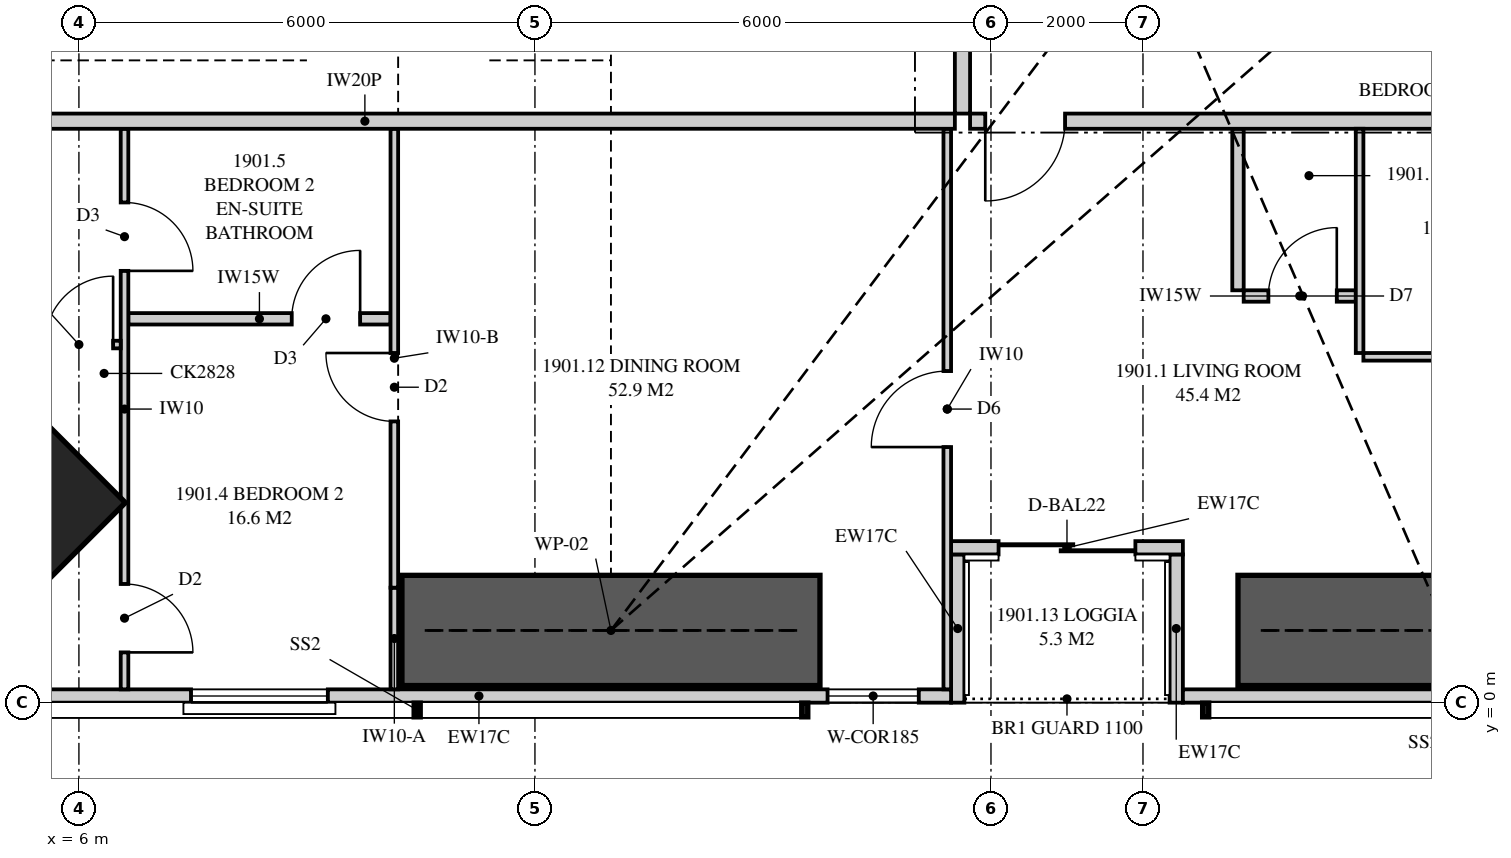
"""IFC4 building model, lengths in metres.
Left out: names, types, materials, properties, quantities, classifications, styles, units other than length and angle.
Written with IfcOpenShell. Run it as: python <this file> out.ifc"""

import sys

from ifc_helpers import new_model, si_unit, direction, frame, frame_2d, origin, origin_2d, place, context, subcontext, project, spatial, polyline, rectangle, hollow_rectangle, outline, extrude, element, fill, save


model = new_model("IFC4")
c1 = context("Model", 3, precision=1e-05, world=origin(), true_north=direction((0.0, 1.0)))
c2 = subcontext(c1, "Body", "Model", "MODEL_VIEW")
j1 = project(units=[si_unit("LENGTHUNIT", "METRE"), si_unit("PLANEANGLEUNIT", "RADIAN")], contexts=[c1])
p1 = place(None, origin())
s1 = spatial("IfcSite", under=j1, at=p1, CompositionType="ELEMENT")
p2 = place(p1, origin())
s2 = spatial("IfcBuilding", under=s1, at=p2, CompositionType="ELEMENT")
p3 = place(p2, frame((0.0, 0.0, 71.25)))
s3 = spatial("IfcBuildingStorey", under=s2, at=p3, CompositionType="ELEMENT", Elevation=71.25)
p4 = place(p3, frame((4.631, 2.631, 0.0), z_axis=(0.0, 0.0, 1.0), x_axis=(0.707106781187, 0.707106781187, 0.0)))
e1 = element("IfcColumn", 1, at=p4, inside=s3, PredefinedType="COLUMN", context=c2, shape_type="SweptSolid", body=[
    extrude(hollow_rectangle(XDim=2.8, YDim=2.8, WallThickness=0.175, at=origin_2d()), origin(), (0.0, 0.0, 1.0), 3.5),
])
p5 = place(p3, frame((5.051, 0.087, 0.0), z_axis=(0.0, 0.0, 1.0), x_axis=(1.0, 0.0, 0.0)))
e2 = element("IfcWall", 2, at=p5, inside=s3, PredefinedType="SOLIDWALL", context=c2, shape_type="SweptSolid", body=[
    extrude(rectangle(XDim=12.424, YDim=0.175, at=frame_2d((6.212, 0.0))), origin(), (0.0, 0.0, 1.0), 3.22),
])
p6 = place(p5, frame((2.424, 0.0, 0.4)))
e3 = element("IfcOpeningElement", 3, at=p6, cuts=e2, PredefinedType="OPENING", context=c2, shape_type="SweptSolid", body=[
    extrude(rectangle(XDim=1.8, YDim=1.85, at=frame_2d((0.9, 0.925))), frame((0.0, 0.097, 0.0), z_axis=(0.0, -1.0, 0.0), x_axis=(1.0, 0.0, 0.0)), (0.0, 0.0, 1.0), 0.195),
])
p7 = place(p5, frame((10.799, 0.0, 0.4)))
e4 = element("IfcOpeningElement", 4, at=p7, cuts=e2, PredefinedType="OPENING", context=c2, shape_type="SweptSolid", body=[
    extrude(rectangle(XDim=1.2, YDim=1.85, at=frame_2d((0.6, 0.925))), frame((0.0, 0.097, 0.0), z_axis=(0.0, -1.0, 0.0), x_axis=(1.0, 0.0, 0.0)), (0.0, 0.0, 1.0), 0.195),
])
p8 = place(p3, frame((20.525, 0.087, 0.0), z_axis=(0.0, 0.0, 1.0), x_axis=(1.0, 0.0, 0.0)))
e5 = element("IfcWall", 5, at=p8, inside=s3, PredefinedType="SOLIDWALL", context=c2, shape_type="SweptSolid", body=[
    extrude(rectangle(XDim=17.275, YDim=0.175, at=frame_2d((8.638, 0.0))), origin(), (0.0, 0.0, 1.0), 3.22),
])
p9 = place(p8, frame((6.775, 0.0, 0.4)))
e6 = element("IfcOpeningElement", 6, at=p9, cuts=e5, PredefinedType="OPENING", context=c2, shape_type="SweptSolid", body=[
    extrude(rectangle(XDim=1.8, YDim=1.85, at=frame_2d((0.9, 0.925))), frame((0.0, 0.097, 0.0), z_axis=(0.0, -1.0, 0.0), x_axis=(1.0, 0.0, 0.0)), (0.0, 0.0, 1.0), 0.195),
])
p10 = place(p8, frame((9.81, 0.0, 0.4)))
e7 = element("IfcOpeningElement", 7, at=p10, cuts=e5, PredefinedType="OPENING", context=c2, shape_type="SweptSolid", body=[
    extrude(rectangle(XDim=1.8, YDim=1.85, at=frame_2d((0.9, 0.925))), frame((0.0, 0.097, 0.0), z_axis=(0.0, -1.0, 0.0), x_axis=(1.0, 0.0, 0.0)), (0.0, 0.0, 1.0), 0.195),
])
p11 = place(p3, frame((17.475, 2.038, 0.0), z_axis=(0.0, 0.0, 1.0), x_axis=(1.0, 0.0, 0.0)))
e8 = element("IfcWall", 8, at=p11, inside=s3, PredefinedType="SOLIDWALL", context=c2, shape_type="SweptSolid", body=[
    extrude(rectangle(XDim=3.05, YDim=0.175, at=frame_2d((1.525, 0.0))), origin(), (0.0, 0.0, 1.0), 3.22),
])
p12 = place(p11, frame((0.625, 0.0, 0.0)))
e9 = element("IfcOpeningElement", 9, at=p12, cuts=e8, PredefinedType="OPENING", context=c2, shape_type="SweptSolid", body=[
    extrude(rectangle(XDim=1.8, YDim=2.25, at=frame_2d((0.9, 1.125))), frame((0.0, 0.097, 0.0), z_axis=(0.0, -1.0, 0.0), x_axis=(1.0, 0.0, 0.0)), (0.0, 0.0, 1.0), 0.195),
])
for number, where, z_axis, x_axis in (
    (10, (17.562, 0.0, 0.0), (0.0, 0.0, 1.0), (0.0, 1.0, 0.0)),
    (11, (20.438, 0.0, 0.0), (0.0, 0.0, 1.0), (0.0, 1.0, 0.0)),
):
    element("IfcWall", number, at=place(p3, frame(where, z_axis=z_axis, x_axis=x_axis)), inside=s3, PredefinedType="SOLIDWALL", context=c2, shape_type="SweptSolid", body=[
        extrude(outline(polyline([(0.0, 0.0), (1.95, 0.0), (1.95, 3.22), (1.65, 3.22), (1.65, 2.1), (0.25, 2.1), (0.25, 3.22), (0.0, 3.22), (0.0, 0.0)])), frame((0.0, 0.087, 0.0), z_axis=(0.0, -1.0, 0.0), x_axis=(1.0, 0.0, 0.0)), (0.0, 0.0, 1.0), 0.175),
    ])
p13 = place(p3, frame((17.725, 7.65, 0.0), z_axis=(0.0, 0.0, 1.0), x_axis=(1.0, 0.0, 0.0)))
e12 = element("IfcWall", 12, at=p13, inside=s3, PredefinedType="PARTITIONING", context=c2, shape_type="SweptSolid", body=[
    extrude(outline(polyline([(0.0, 0.0), (16.075, 0.0), (16.075, 3.22), (12.137, 3.22), (12.137, 2.641), (11.364, 2.641), (11.364, 3.22), (11.217, 3.22), (11.217, 2.641), (10.366, 2.641), (10.366, 3.22), (6.564, 3.22), (6.564, 2.694), (5.986, 2.694), (5.986, 3.22), (3.693, 3.22), (3.693, 2.641), (2.439, 2.641), (2.439, 3.22), (0.689, 3.22), (0.689, 2.641), (0.0, 2.641), (0.0, 0.0)])), frame((0.0, 0.1, 0.0), z_axis=(0.0, -1.0, 0.0), x_axis=(1.0, 0.0, 0.0)), (0.0, 0.0, 1.0), 0.2),
])
p14 = place(p13, frame((0.2, 0.0, 0.0)))
e13 = element("IfcOpeningElement", 13, at=p14, cuts=e12, PredefinedType="OPENING", context=c2, shape_type="SweptSolid", body=[
    extrude(rectangle(XDim=1.05, YDim=2.2, at=frame_2d((0.525, 1.1))), frame((0.0, 0.11, 0.0), z_axis=(0.0, -1.0, 0.0), x_axis=(1.0, 0.0, 0.0)), (0.0, 0.0, 1.0), 0.22),
])
p15 = place(p3, frame((6.6, 0.175, 0.0), z_axis=(0.0, 0.0, 1.0), x_axis=(0.0, 1.0, 0.0)))
e14 = element("IfcWall", 14, at=p15, inside=s3, PredefinedType="PARTITIONING", context=c2, shape_type="SweptSolid", body=[
    extrude(outline(polyline([(0.0, 0.0), (7.375, 0.0), (7.375, 3.22), (2.863, 3.22), (2.863, 2.848), (2.785, 2.854), (2.785, 2.1), (1.337, 2.1), (1.337, 3.22), (0.0, 3.22), (0.0, 0.0)])), frame((0.0, 0.05, 0.0), z_axis=(0.0, -1.0, 0.0), x_axis=(1.0, 0.0, 0.0)), (0.0, 0.0, 1.0), 0.1),
])
p16 = place(p15, frame((0.486, 0.0, 0.0)))
e15 = element("IfcOpeningElement", 15, at=p16, cuts=e14, PredefinedType="OPENING", context=c2, shape_type="SweptSolid", body=[
    extrude(rectangle(XDim=0.9, YDim=2.1, at=frame_2d((0.45, 1.05))), frame((0.0, 0.06, 0.0), z_axis=(0.0, -1.0, 0.0), x_axis=(1.0, 0.0, 0.0)), (0.0, 0.0, 1.0), 0.12),
])
p17 = place(p15, frame((5.506, 0.0, 0.0)))
e16 = element("IfcOpeningElement", 16, at=p17, cuts=e14, PredefinedType="OPENING", context=c2, shape_type="SweptSolid", body=[
    extrude(rectangle(XDim=0.9, YDim=2.1, at=frame_2d((0.45, 1.05))), frame((0.0, 0.06, 0.0), z_axis=(0.0, -1.0, 0.0), x_axis=(1.0, 0.0, 0.0)), (0.0, 0.0, 1.0), 0.12),
])
p18 = place(p3, frame((10.15, 0.175, 0.0), z_axis=(0.0, 0.0, 1.0), x_axis=(0.0, 1.0, 0.0)))
e17 = element("IfcWall", 17, at=p18, inside=s3, PredefinedType="PARTITIONING", context=c2, shape_type="SweptSolid", body=[
    extrude(outline(polyline([(0.0, 0.0), (1.338, 0.0), (1.338, 2.1), (0.624, 2.1), (0.624, 3.22), (0.0, 3.22), (0.0, 0.0)])), frame((0.0, 0.05, 0.0), z_axis=(0.0, -1.0, 0.0), x_axis=(1.0, 0.0, 0.0)), (0.0, 0.0, 1.0), 0.1),
])
p19 = place(p3, frame((10.15, 1.513, 0.0), z_axis=(0.0, 0.0, 1.0), x_axis=(0.0, 1.0, 0.0)))
e18 = element("IfcWall", 18, at=p19, inside=s3, PredefinedType="PARTITIONING", context=c2, shape_type="SweptSolid", body=[
    extrude(outline(polyline([(0.0, 0.0), (6.037, 0.0), (6.037, 2.62), (0.734, 2.62), (0.734, 2.1), (0.0, 2.1), (0.0, 0.0)])), frame((0.0, 0.05, 0.0), z_axis=(0.0, -1.0, 0.0), x_axis=(1.0, 0.0, 0.0)), (0.0, 0.0, 1.0), 0.1),
])
p20 = place(p19, frame((2.188, 0.0, 0.0)))
e19 = element("IfcOpeningElement", 19, at=p20, cuts=e18, PredefinedType="OPENING", context=c2, shape_type="SweptSolid", body=[
    extrude(rectangle(XDim=0.9, YDim=2.1, at=frame_2d((0.45, 1.05))), frame((0.0, 0.06, 0.0), z_axis=(0.0, -1.0, 0.0), x_axis=(1.0, 0.0, 0.0)), (0.0, 0.0, 1.0), 0.12),
])
p21 = place(p3, frame((2.0, 4.711, 0.0), z_axis=(0.0, 0.0, 1.0), x_axis=(1.0, 0.0, 0.0)))
e20 = element("IfcWall", 20, at=p21, inside=s3, PredefinedType="PARTITIONING", context=c2, shape_type="SweptSolid", body=[
    extrude(outline(polyline([(0.0, 0.0), (4.55, 0.0), (4.55, 3.22), (3.407, 3.22), (3.407, 3.01), (3.404, 2.955), (3.011, 2.949), (3.011, 2.1), (1.577, 2.1), (1.577, 3.22), (0.0, 3.22), (0.0, 0.0)])), frame((0.0, 0.05, 0.0), z_axis=(0.0, -1.0, 0.0), x_axis=(1.0, 0.0, 0.0)), (0.0, 0.0, 1.0), 0.1),
])
p22 = place(p21, frame((3.55, 0.0, 0.0)))
e21 = element("IfcOpeningElement", 21, at=p22, cuts=e20, PredefinedType="OPENING", context=c2, shape_type="SweptSolid", body=[
    extrude(rectangle(XDim=0.9, YDim=2.1, at=frame_2d((0.45, 1.05))), frame((0.0, 0.06, 0.0), z_axis=(0.0, -1.0, 0.0), x_axis=(1.0, 0.0, 0.0)), (0.0, 0.0, 1.0), 0.12),
])
p23 = place(p3, frame((6.65, 5.05, 0.0), z_axis=(0.0, 0.0, 1.0), x_axis=(1.0, 0.0, 0.0)))
e22 = element("IfcWall", 22, at=p23, inside=s3, PredefinedType="PLUMBINGWALL", context=c2, shape_type="SweptSolid", body=[
    extrude(outline(polyline([(0.0, 0.0), (3.45, 0.0), (3.45, 3.22), (3.45, 2.62), (2.265, 2.62), (2.265, 3.22), (0.0, 3.22), (0.0, 0.0)])), frame((0.0, 0.075, 0.0), z_axis=(0.0, -1.0, 0.0), x_axis=(1.0, 0.0, 0.0)), (0.0, 0.0, 1.0), 0.15),
])
p24 = place(p23, frame((2.15, 0.0, 0.0)))
e23 = element("IfcOpeningElement", 23, at=p24, cuts=e22, PredefinedType="OPENING", context=c2, shape_type="SweptSolid", body=[
    extrude(rectangle(XDim=0.9, YDim=2.1, at=frame_2d((0.45, 1.05))), frame((0.0, 0.085, 0.0), z_axis=(0.0, -1.0, 0.0), x_axis=(1.0, 0.0, 0.0)), (0.0, 0.0, 1.0), 0.17),
])
p25 = place(p3, frame((22.9, 4.55, 0.0), z_axis=(0.0, 0.0, 1.0), x_axis=(1.0, 0.0, 0.0)))
e24 = element("IfcWall", 24, at=p25, inside=s3, PredefinedType="PARTITIONING", context=c2, shape_type="SweptSolid", body=[
    extrude(outline(polyline([(0.0, 0.0), (3.55, 0.0), (3.55, 3.22), (1.389, 3.22), (1.389, 2.694), (0.811, 2.694), (0.811, 3.22), (0.0, 3.22), (0.0, 0.0)])), frame((0.0, 0.05, 0.0), z_axis=(0.0, -1.0, 0.0), x_axis=(1.0, 0.0, 0.0)), (0.0, 0.0, 1.0), 0.1),
])
p26 = place(p25, frame((1.3, 0.0, 0.0)))
e25 = element("IfcOpeningElement", 25, at=p26, cuts=e24, PredefinedType="OPENING", context=c2, shape_type="SweptSolid", body=[
    extrude(rectangle(XDim=0.9, YDim=2.1, at=frame_2d((0.45, 1.05))), frame((0.0, 0.06, 0.0), z_axis=(0.0, -1.0, 0.0), x_axis=(1.0, 0.0, 0.0)), (0.0, 0.0, 1.0), 0.12),
])
p27 = place(p3, frame((22.85, 4.6, 0.0), z_axis=(0.0, 0.0, 1.0), x_axis=(0.0, 1.0, 0.0)))
e26 = element("IfcWall", 26, at=p27, inside=s3, PredefinedType="PARTITIONING", context=c2, shape_type="SweptSolid", body=[
    extrude(rectangle(XDim=2.95, YDim=0.1, at=frame_2d((1.475, 0.0))), origin(), (0.0, 0.0, 1.0), 3.22),
])
p28 = place(p3, frame((21.325, 5.35, 0.0), z_axis=(0.0, 0.0, 1.0), x_axis=(1.0, 0.0, 0.0)))
e27 = element("IfcWall", 27, at=p28, inside=s3, PredefinedType="PLUMBINGWALL", context=c2, shape_type="SweptSolid", body=[
    extrude(outline(polyline([(0.0, 0.0), (1.475, 0.0), (1.475, 3.22), (1.072, 3.22), (1.072, 2.641), (0.493, 2.641), (0.493, 3.22), (0.0, 3.22), (0.0, 0.0)])), frame((0.0, 0.075, 0.0), z_axis=(0.0, -1.0, 0.0), x_axis=(1.0, 0.0, 0.0)), (0.0, 0.0, 1.0), 0.15),
])
p29 = place(p28, frame((0.325, 0.0, 0.0)))
e28 = element("IfcOpeningElement", 28, at=p29, cuts=e27, PredefinedType="OPENING", context=c2, shape_type="SweptSolid", body=[
    extrude(rectangle(XDim=0.9, YDim=2.1, at=frame_2d((0.45, 1.05))), frame((0.0, 0.085, 0.0), z_axis=(0.0, -1.0, 0.0), x_axis=(1.0, 0.0, 0.0)), (0.0, 0.0, 1.0), 0.17),
])
p30 = place(p3, frame((21.25, 5.425, 0.0), z_axis=(0.0, 0.0, 1.0), x_axis=(0.0, 1.0, 0.0)))
e29 = element("IfcWall", 29, at=p30, inside=s3, PredefinedType="PLUMBINGWALL", context=c2, shape_type="SweptSolid", body=[
    extrude(outline(polyline([(0.0, 0.0), (2.125, 0.0), (2.125, 2.641), (1.146, 2.641), (1.146, 3.22), (0.0, 3.22), (0.0, 0.0)])), frame((0.0, 0.075, 0.0), z_axis=(0.0, -1.0, 0.0), x_axis=(1.0, 0.0, 0.0)), (0.0, 0.0, 1.0), 0.15),
])
p31 = place(p3, frame((17.425, 0.175, 0.0), z_axis=(0.0, 0.0, 1.0), x_axis=(0.0, 1.0, 0.0)))
e30 = element("IfcWall", 30, at=p31, inside=s3, PredefinedType="PARTITIONING", context=c2, shape_type="SweptSolid", body=[
    extrude(outline(polyline([(0.0, 0.0), (7.375, 0.0), (7.375, 3.22), (7.113, 3.22), (7.113, 2.641), (6.195, 2.641), (6.195, 3.22), (5.015, 3.22), (5.015, 2.641), (4.299, 2.641), (4.299, 3.22), (1.475, 3.22), (1.475, 2.1), (0.075, 2.1), (0.075, 3.22), (0.0, 3.22), (0.0, 0.0)])), frame((0.0, 0.05, 0.0), z_axis=(0.0, -1.0, 0.0), x_axis=(1.0, 0.0, 0.0)), (0.0, 0.0, 1.0), 0.1),
])
p32 = place(p31, frame((3.188, 0.0, 0.0)))
e31 = element("IfcOpeningElement", 31, at=p32, cuts=e30, PredefinedType="OPENING", context=c2, shape_type="SweptSolid", body=[
    extrude(rectangle(XDim=1.0, YDim=2.1, at=frame_2d((0.5, 1.05))), frame((0.0, 0.06, 0.0), z_axis=(0.0, -1.0, 0.0), x_axis=(1.0, 0.0, 0.0)), (0.0, 0.0, 1.0), 0.12),
])
p33 = place(p3, frame((2.0, 7.65, 0.0), z_axis=(0.0, 0.0, 1.0), x_axis=(1.0, 0.0, 0.0)))
e32 = element("IfcWall", 32, at=p33, inside=s3, PredefinedType="PARTITIONING", context=c2, shape_type="SweptSolid", body=[
    extrude(outline(polyline([(0.0, 0.0), (15.525, 0.0), (15.525, 3.22), (11.349, 3.22), (11.349, 2.621), (10.651, 2.621), (10.651, 3.22), (9.51, 3.22), (9.51, 2.62), (6.89, 2.62), (6.89, 3.22), (2.98, 3.22), (2.98, 2.621), (2.543, 2.621), (2.543, 2.1), (1.092, 2.1), (1.092, 3.22), (0.0, 3.22), (0.0, 0.0)])), frame((0.0, 0.1, 0.0), z_axis=(0.0, -1.0, 0.0), x_axis=(1.0, 0.0, 0.0)), (0.0, 0.0, 1.0), 0.2),
])
p34 = place(p3, frame((17.625, 7.75, 0.0), z_axis=(0.0, 0.0, 1.0), x_axis=(0.0, 1.0, 0.0)))
e33 = element("IfcWall", 33, at=p34, inside=s3, PredefinedType="PARTITIONING", context=c2, shape_type="SweptSolid", body=[
    extrude(outline(polyline([(0.0, 0.0), (6.15, 0.0), (6.15, 3.22), (5.75, 3.22), (5.75, 2.22), (4.75, 2.22), (4.75, 3.22), (0.0, 3.22), (0.0, 0.0)])), frame((0.0, 0.1, 0.0), z_axis=(0.0, -1.0, 0.0), x_axis=(1.0, 0.0, 0.0)), (0.0, 0.0, 1.0), 0.2),
])
p35 = place(p34, frame((2.175, 0.0, 0.0)))
e34 = element("IfcOpeningElement", 34, at=p35, cuts=e33, PredefinedType="OPENING", context=c2, shape_type="SweptSolid", body=[
    extrude(rectangle(XDim=1.8, YDim=2.1, at=frame_2d((0.9, 1.05))), frame((0.0, 0.11, 0.0), z_axis=(0.0, -1.0, 0.0), x_axis=(1.0, 0.0, 0.0)), (0.0, 0.0, 1.0), 0.22),
])
for number, where, z_axis, x_axis in (
    (35, (10.25, 0.95, 0.0), (0.0, 0.0, 1.0), (1.0, 0.0, 0.0)),
    (36, (21.25, 0.95, 0.0), (0.0, 0.0, 1.0), (1.0, 0.0, 0.0)),
):
    element("IfcWall", number, at=place(p3, frame(where, z_axis=z_axis, x_axis=x_axis)), inside=s3, PredefinedType="SHEAR", context=c2, shape_type="SweptSolid", body=[
        extrude(rectangle(XDim=5.5, YDim=1.45, at=frame_2d((2.75, 0.0))), origin(), (0.0, 0.0, 1.0), 3.5),
    ])
p36 = place(p6, origin())
e37 = element("IfcWindow", 37, at=p36, inside=s3, PartitioningType="SINGLE_PANEL", PredefinedType="WINDOW", context=c2, shape_type="SweptSolid", body=[
    extrude(rectangle(XDim=1.8, YDim=1.85, at=frame_2d((0.9, 0.925))), frame((0.0, 0.03, 0.0), z_axis=(0.0, -1.0, 0.0), x_axis=(1.0, 0.0, 0.0)), (0.0, 0.0, 1.0), 0.06),
])
fill(e3, e37)
p37 = place(p7, origin())
e38 = element("IfcWindow", 38, at=p37, inside=s3, PartitioningType="SINGLE_PANEL", PredefinedType="WINDOW", context=c2, shape_type="SweptSolid", body=[
    extrude(rectangle(XDim=1.2, YDim=1.85, at=frame_2d((0.6, 0.925))), frame((0.0, 0.03, 0.0), z_axis=(0.0, -1.0, 0.0), x_axis=(1.0, 0.0, 0.0)), (0.0, 0.0, 1.0), 0.06),
])
fill(e4, e38)
p38 = place(p12, origin())
e39 = element("IfcDoor", 39, at=p38, inside=s3, OperationType="SLIDING_TO_LEFT", PredefinedType="DOOR", context=c2, shape_type="SweptSolid", body=[
    extrude(rectangle(XDim=1.8, YDim=2.25, at=frame_2d((0.9, 1.125))), frame((0.0, 0.025, 0.0), z_axis=(0.0, -1.0, 0.0), x_axis=(1.0, 0.0, 0.0)), (0.0, 0.0, 1.0), 0.05),
])
fill(e9, e39)
p39 = place(p14, frame((1.05, 0.0, 0.0), z_axis=(0.0, 0.0, 1.0), x_axis=(-1.0, 0.0, 0.0)))
e40 = element("IfcDoor", 40, at=p39, inside=s3, OperationType="SINGLE_SWING_RIGHT", PredefinedType="DOOR", context=c2, shape_type="SweptSolid", body=[
    extrude(rectangle(XDim=1.05, YDim=2.2, at=frame_2d((0.525, 1.1))), frame((0.0, 0.025, 0.0), z_axis=(0.0, -1.0, 0.0), x_axis=(1.0, 0.0, 0.0)), (0.0, 0.0, 1.0), 0.05),
])
fill(e13, e40)
p40 = place(p22, origin())
e41 = element("IfcDoor", 41, at=p40, inside=s3, OperationType="SINGLE_SWING_RIGHT", PredefinedType="DOOR", context=c2, shape_type="SweptSolid", body=[
    extrude(rectangle(XDim=0.9, YDim=2.1, at=frame_2d((0.45, 1.05))), frame((0.0, 0.025, 0.0), z_axis=(0.0, -1.0, 0.0), x_axis=(1.0, 0.0, 0.0)), (0.0, 0.0, 1.0), 0.05),
])
fill(e21, e41)
p41 = place(p16, frame((0.9, 0.0, 0.0), z_axis=(0.0, 0.0, 1.0), x_axis=(-1.0, 0.0, 0.0)))
e42 = element("IfcDoor", 42, at=p41, inside=s3, OperationType="SINGLE_SWING_RIGHT", PredefinedType="DOOR", context=c2, shape_type="SweptSolid", body=[
    extrude(rectangle(XDim=0.9, YDim=2.1, at=frame_2d((0.45, 1.05))), frame((0.0, 0.025, 0.0), z_axis=(0.0, -1.0, 0.0), x_axis=(1.0, 0.0, 0.0)), (0.0, 0.0, 1.0), 0.05),
])
fill(e15, e42)
p42 = place(p20, origin())
e43 = element("IfcDoor", 43, at=p42, inside=s3, OperationType="SINGLE_SWING_RIGHT", PredefinedType="DOOR", context=c2, shape_type="SweptSolid", body=[
    extrude(rectangle(XDim=0.9, YDim=2.1, at=frame_2d((0.45, 1.05))), frame((0.0, 0.025, 0.0), z_axis=(0.0, -1.0, 0.0), x_axis=(1.0, 0.0, 0.0)), (0.0, 0.0, 1.0), 0.05),
])
fill(e19, e43)
p43 = place(p24, origin())
e44 = element("IfcDoor", 44, at=p43, inside=s3, OperationType="SINGLE_SWING_RIGHT", PredefinedType="DOOR", context=c2, shape_type="SweptSolid", body=[
    extrude(rectangle(XDim=0.9, YDim=2.1, at=frame_2d((0.45, 1.05))), frame((0.0, 0.025, 0.0), z_axis=(0.0, -1.0, 0.0), x_axis=(1.0, 0.0, 0.0)), (0.0, 0.0, 1.0), 0.05),
])
fill(e23, e44)
p44 = place(p17, frame((0.9, 0.0, 0.0), z_axis=(0.0, 0.0, 1.0), x_axis=(-1.0, 0.0, 0.0)))
e45 = element("IfcDoor", 45, at=p44, inside=s3, OperationType="SINGLE_SWING_RIGHT", PredefinedType="DOOR", context=c2, shape_type="SweptSolid", body=[
    extrude(rectangle(XDim=0.9, YDim=2.1, at=frame_2d((0.45, 1.05))), frame((0.0, 0.025, 0.0), z_axis=(0.0, -1.0, 0.0), x_axis=(1.0, 0.0, 0.0)), (0.0, 0.0, 1.0), 0.05),
])
fill(e16, e45)
p45 = place(p29, origin())
e46 = element("IfcDoor", 46, at=p45, inside=s3, OperationType="SINGLE_SWING_RIGHT", PredefinedType="DOOR", context=c2, shape_type="SweptSolid", body=[
    extrude(rectangle(XDim=0.9, YDim=2.1, at=frame_2d((0.45, 1.05))), frame((0.0, 0.025, 0.0), z_axis=(0.0, -1.0, 0.0), x_axis=(1.0, 0.0, 0.0)), (0.0, 0.0, 1.0), 0.05),
])
fill(e28, e46)
p46 = place(p32, origin())
e47 = element("IfcDoor", 47, at=p46, inside=s3, OperationType="SINGLE_SWING_LEFT", PredefinedType="DOOR", context=c2, shape_type="SweptSolid", body=[
    extrude(rectangle(XDim=1.0, YDim=2.1, at=frame_2d((0.5, 1.05))), frame((0.0, 0.025, 0.0), z_axis=(0.0, -1.0, 0.0), x_axis=(1.0, 0.0, 0.0)), (0.0, 0.0, 1.0), 0.05),
])
fill(e31, e47)
save(model, sys.argv[1])
